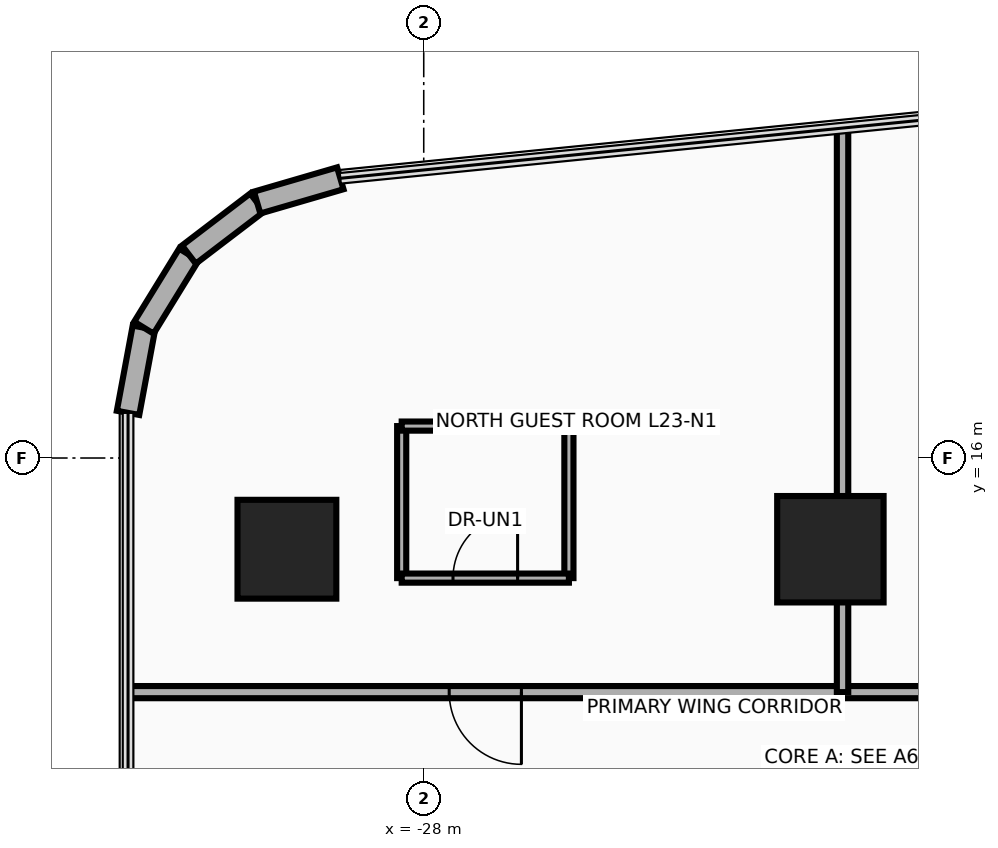
"""IFC4 building model, lengths in metres.
Left out: names, types, materials, properties, quantities, classifications, styles, units other than length and angle.
Written with IfcOpenShell. Run it as: python <this file> out.ifc"""

import sys

from ifc_helpers import new_model, si_unit, direction, frame, frame_2d, origin, origin_2d, place, context, subcontext, project, spatial, rectangle, circle, extrude, source, transform, mapped, element, fill, save


model = new_model("IFC4")
c1 = context("Model", 3, precision=1e-05, world=origin(), true_north=direction((0.0, 1.0)))
c2 = subcontext(c1, "Body", "Model", "MODEL_VIEW")
j1 = project(units=[si_unit("LENGTHUNIT", "METRE"), si_unit("PLANEANGLEUNIT", "RADIAN")], contexts=[c1])
p1 = place(None, origin())
s1 = spatial("IfcSite", under=j1, at=p1, CompositionType="ELEMENT")
p2 = place(p1, origin())
s2 = spatial("IfcBuilding", under=s1, at=p2, CompositionType="ELEMENT")
p3 = place(p2, frame((0.0, 0.0, 92.6)))
s3 = spatial("IfcBuildingStorey", under=s2, at=p3, CompositionType="ELEMENT", Elevation=92.6)
m1 = source(origin(), c2, "Body", "SweptSolid", [
    extrude(circle(Radius=0.65, at=origin_2d()), origin(), (0.0, 0.0, 1.0), 3.7),
])
p4 = place(p3, frame((-29.8, 14.8, 0.0), z_axis=(0.0, 0.0, 1.0), x_axis=(1.0, 0.0, 0.0)))
e1 = element("IfcColumn", 1, at=p4, inside=s3, PredefinedType="COLUMN", context=c2, shape_type="MappedRepresentation", body=[
    mapped(m1, transform((0.0, 0.0, 0.0), x_axis=(1.0, 0.0, 0.0), y_axis=(0.0, 1.0, 0.0), z_axis=(0.0, 0.0, 1.0), scale=1.0)),
])
m2 = source(origin(), c2, "Body", "SweptSolid", [
    extrude(rectangle(XDim=1.4, YDim=1.4, at=origin_2d()), origin(), (0.0, 0.0, 1.0), 3.7),
])
p5 = place(p3, frame((-22.65, 14.8, 0.0), z_axis=(0.0, 0.0, 1.0), x_axis=(1.0, 0.0, 0.0)))
e2 = element("IfcColumn", 2, at=p5, inside=s3, PredefinedType="COLUMN", context=c2, shape_type="MappedRepresentation", body=[
    mapped(m2, transform((0.0, 0.0, 0.0), x_axis=(1.0, 0.0, 0.0), y_axis=(0.0, 1.0, 0.0), z_axis=(0.0, 0.0, 1.0), scale=1.0)),
])
p6 = place(p3, frame((-31.89, 16.594, 0.0), z_axis=(0.0, 0.0, 1.0), x_axis=(0.182748995683, 0.9831596028, 0.0)))
e3 = element("IfcWall", 3, at=p6, inside=s3, PredefinedType="SOLIDWALL", context=c2, shape_type="SweptSolid", body=[
    extrude(rectangle(XDim=1.14, YDim=0.3, at=frame_2d((0.57, 0.0))), origin(), (0.0, 0.0, 1.0), 3.46),
])
p7 = place(p3, frame((-31.682, 17.714, 0.0), z_axis=(0.0, 0.0, 1.0), x_axis=(0.524157723014, 0.8516212077, 0.0)))
e4 = element("IfcWall", 4, at=p7, inside=s3, PredefinedType="SOLIDWALL", context=c2, shape_type="SweptSolid", body=[
    extrude(rectangle(XDim=1.129, YDim=0.3, at=frame_2d((0.565, 0.0))), origin(), (0.0, 0.0, 1.0), 3.46),
])
p8 = place(p3, frame((-31.09, 18.676, 0.0), z_axis=(0.0, 0.0, 1.0), x_axis=(0.795253002434, 0.606277710393, 0.0)))
e5 = element("IfcWall", 5, at=p8, inside=s3, PredefinedType="SOLIDWALL", context=c2, shape_type="SweptSolid", body=[
    extrude(rectangle(XDim=1.129, YDim=0.3, at=frame_2d((0.564, 0.0))), origin(), (0.0, 0.0, 1.0), 3.46),
])
p9 = place(p3, frame((-30.192, 19.361, 0.0), z_axis=(0.0, 0.0, 1.0), x_axis=(0.960071941549, 0.279753225271, 0.0)))
e6 = element("IfcWall", 6, at=p9, inside=s3, PredefinedType="SOLIDWALL", context=c2, shape_type="SweptSolid", body=[
    extrude(rectangle(XDim=1.14, YDim=0.3, at=frame_2d((0.57, 0.0))), origin(), (0.0, 0.0, 1.0), 3.46),
])
p10 = place(p3, frame((-31.89, 12.92, 0.0), z_axis=(0.0, 0.0, 1.0), x_axis=(1.0, 0.0, 0.0)))
e7 = element("IfcWall", 7, at=p10, inside=s3, PredefinedType="PARTITIONING", context=c2, shape_type="SweptSolid", body=[
    extrude(rectangle(XDim=45.44, YDim=0.16, at=frame_2d((22.72, 0.0))), origin(), (0.0, 0.0, 1.0), 2.583),
])
p11 = place(p10, frame((4.225, 0.0, 0.0)))
e8 = element("IfcOpeningElement", 8, at=p11, cuts=e7, PredefinedType="OPENING", context=c2, shape_type="SweptSolid", body=[
    extrude(rectangle(XDim=0.95, YDim=2.15, at=frame_2d((0.475, 1.075))), frame((0.0, 0.095, 0.0), z_axis=(0.0, -1.0, 0.0), x_axis=(1.0, 0.0, 0.0)), (0.0, 0.0, 1.0), 0.19),
])
p12 = place(p10, frame((13.43, 0.0, 0.0)))
e9 = element("IfcOpeningElement", 9, at=p12, cuts=e7, PredefinedType="OPENING", context=c2, shape_type="SweptSolid", body=[
    extrude(rectangle(XDim=0.95, YDim=2.15, at=frame_2d((0.475, 1.075))), frame((0.0, 0.095, 0.0), z_axis=(0.0, -1.0, 0.0), x_axis=(1.0, 0.0, 0.0)), (0.0, 0.0, 1.0), 0.19),
])
p13 = place(p10, frame((20.31, 0.0, 0.0)))
e10 = element("IfcOpeningElement", 10, at=p13, cuts=e7, PredefinedType="OPENING", context=c2, shape_type="SweptSolid", body=[
    extrude(rectangle(XDim=0.95, YDim=2.15, at=frame_2d((0.475, 1.075))), frame((0.0, 0.095, 0.0), z_axis=(0.0, -1.0, 0.0), x_axis=(1.0, 0.0, 0.0)), (0.0, 0.0, 1.0), 0.19),
])
p14 = place(p10, frame((25.517, 0.0, 0.0)))
e11 = element("IfcOpeningElement", 11, at=p14, cuts=e7, PredefinedType="OPENING", context=c2, shape_type="SweptSolid", body=[
    extrude(rectangle(XDim=0.95, YDim=2.15, at=frame_2d((0.475, 1.075))), frame((0.0, 0.095, 0.0), z_axis=(0.0, -1.0, 0.0), x_axis=(1.0, 0.0, 0.0)), (0.0, 0.0, 1.0), 0.19),
])
p15 = place(p10, frame((28.373, 0.0, 0.0)))
e12 = element("IfcOpeningElement", 12, at=p15, cuts=e7, PredefinedType="OPENING", context=c2, shape_type="SweptSolid", body=[
    extrude(rectangle(XDim=0.95, YDim=2.15, at=frame_2d((0.475, 1.075))), frame((0.0, 0.095, 0.0), z_axis=(0.0, -1.0, 0.0), x_axis=(1.0, 0.0, 0.0)), (0.0, 0.0, 1.0), 0.19),
])
p16 = place(p10, frame((34.527, 0.0, 0.0)))
e13 = element("IfcOpeningElement", 13, at=p16, cuts=e7, PredefinedType="OPENING", context=c2, shape_type="SweptSolid", body=[
    extrude(rectangle(XDim=0.95, YDim=2.15, at=frame_2d((0.475, 1.075))), frame((0.0, 0.095, 0.0), z_axis=(0.0, -1.0, 0.0), x_axis=(1.0, 0.0, 0.0)), (0.0, 0.0, 1.0), 0.19),
])
p17 = place(p10, frame((39.36, 0.0, 0.0)))
e14 = element("IfcOpeningElement", 14, at=p17, cuts=e7, PredefinedType="OPENING", context=c2, shape_type="SweptSolid", body=[
    extrude(rectangle(XDim=0.95, YDim=2.15, at=frame_2d((0.475, 1.075))), frame((0.0, 0.095, 0.0), z_axis=(0.0, -1.0, 0.0), x_axis=(1.0, 0.0, 0.0)), (0.0, 0.0, 1.0), 0.19),
])
p18 = place(p3, frame((-22.49, 12.92, 0.0), z_axis=(0.0, 0.0, 1.0), x_axis=(0.0, 1.0, 0.0)))
e15 = element("IfcWall", 15, at=p18, inside=s3, PredefinedType="PARTITIONING", context=c2, shape_type="SweptSolid", body=[
    extrude(rectangle(XDim=7.421, YDim=0.15, at=frame_2d((3.71, 0.0))), origin(), (0.0, 0.0, 1.0), 2.583),
])
for number, where, z_axis, x_axis in (
    (16, (-28.29, 14.42, 0.0), (0.0, 0.0, 1.0), (0.0, 1.0, 0.0)),
    (17, (-26.09, 14.42, 0.0), (0.0, 0.0, 1.0), (0.0, 1.0, 0.0)),
):
    element("IfcWall", number, at=place(p3, frame(where, z_axis=z_axis, x_axis=x_axis)), inside=s3, PredefinedType="PARTITIONING", context=c2, shape_type="SweptSolid", body=[
        extrude(rectangle(XDim=2.0, YDim=0.12, at=frame_2d((1.0, 0.0))), origin(), (0.0, 0.0, 1.0), 2.583),
    ])
p19 = place(p3, frame((-28.29, 16.42, 0.0), z_axis=(0.0, 0.0, 1.0), x_axis=(1.0, 0.0, 0.0)))
e18 = element("IfcWall", 18, at=p19, inside=s3, PredefinedType="PARTITIONING", context=c2, shape_type="SweptSolid", body=[
    extrude(rectangle(XDim=2.2, YDim=0.12, at=frame_2d((1.1, 0.0))), origin(), (0.0, 0.0, 1.0), 3.46),
])
p20 = place(p3, frame((-28.29, 14.42, 0.0), z_axis=(0.0, 0.0, 1.0), x_axis=(1.0, 0.0, 0.0)))
e19 = element("IfcWall", 19, at=p20, inside=s3, PredefinedType="PARTITIONING", context=c2, shape_type="SweptSolid", body=[
    extrude(rectangle(XDim=2.2, YDim=0.12, at=frame_2d((1.1, 0.0))), origin(), (0.0, 0.0, 1.0), 3.46),
])
p21 = place(p20, frame((0.675, 0.0, 0.0)))
e20 = element("IfcOpeningElement", 20, at=p21, cuts=e19, PredefinedType="OPENING", context=c2, shape_type="SweptSolid", body=[
    extrude(rectangle(XDim=0.85, YDim=2.1, at=frame_2d((0.425, 1.05))), frame((0.0, 0.075, 0.0), z_axis=(0.0, -1.0, 0.0), x_axis=(1.0, 0.0, 0.0)), (0.0, 0.0, 1.0), 0.15),
])
p22 = place(p11, frame((0.95, 0.0, 0.0), z_axis=(0.0, 0.0, 1.0), x_axis=(-1.0, 0.0, 0.0)))
e21 = element("IfcDoor", 21, at=p22, inside=s3, OperationType="SINGLE_SWING_LEFT", PredefinedType="DOOR", context=c2, shape_type="SweptSolid", body=[
    extrude(rectangle(XDim=0.95, YDim=2.15, at=frame_2d((0.475, 1.075))), frame((0.0, 0.025, 0.0), z_axis=(0.0, -1.0, 0.0), x_axis=(1.0, 0.0, 0.0)), (0.0, 0.0, 1.0), 0.05),
])
fill(e8, e21)
p23 = place(p21, origin())
e22 = element("IfcDoor", 22, at=p23, inside=s3, OperationType="SINGLE_SWING_RIGHT", PredefinedType="DOOR", context=c2, shape_type="SweptSolid", body=[
    extrude(rectangle(XDim=0.85, YDim=2.1, at=frame_2d((0.425, 1.05))), frame((0.0, 0.025, 0.0), z_axis=(0.0, -1.0, 0.0), x_axis=(1.0, 0.0, 0.0)), (0.0, 0.0, 1.0), 0.05),
])
fill(e20, e22)
save(model, sys.argv[1])
